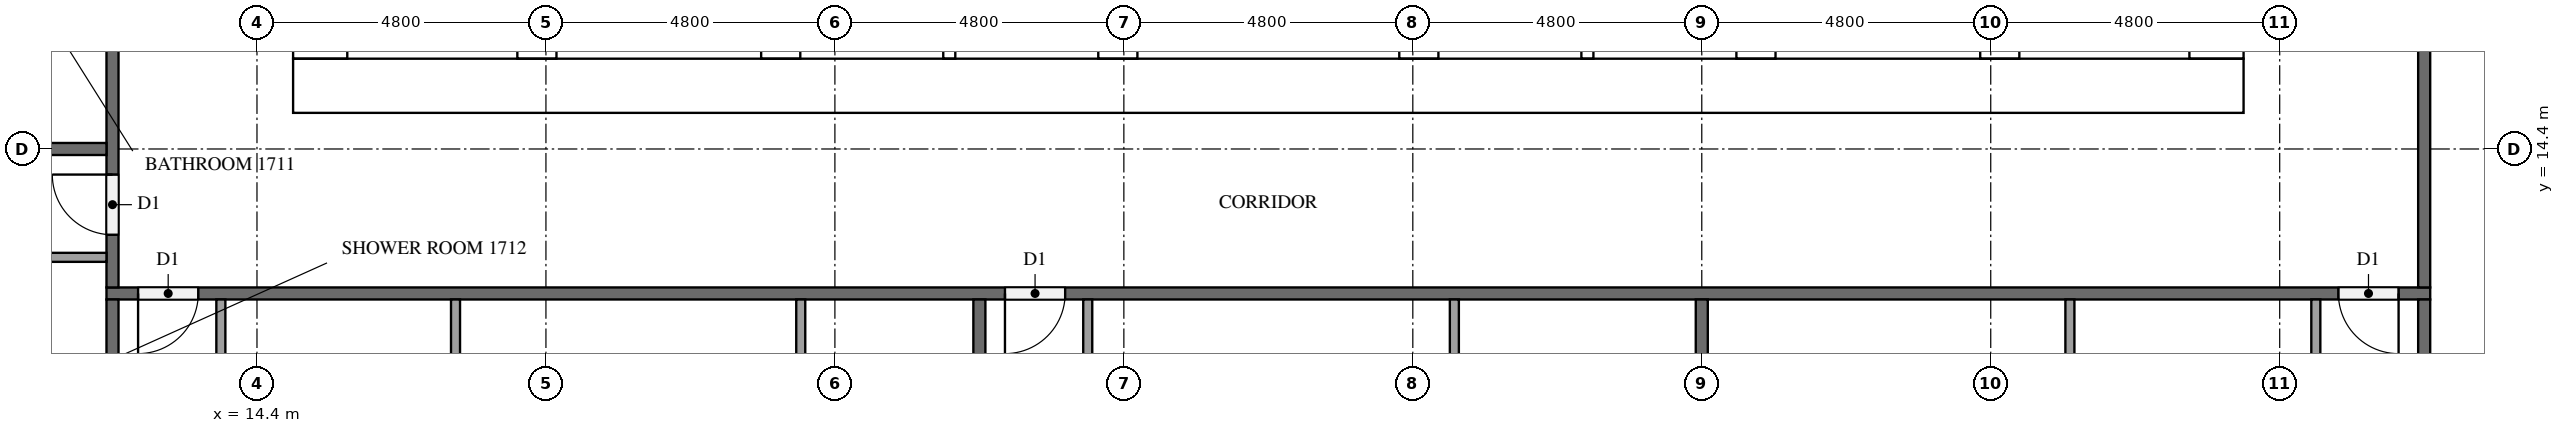
"""IFC4 building model, lengths in metres.
Left out: names, types, materials, properties, quantities, classifications, styles, units other than length and angle.
Written with IfcOpenShell. Run it as: python <this file> out.ifc"""

import sys

from ifc_helpers import new_model, si_unit, direction, frame, frame_2d, origin, place, context, subcontext, project, spatial, rectangle, extrude, element, fill, save


model = new_model("IFC4")
c1 = context("Model", 3, precision=1e-05, world=origin(), true_north=direction((0.0, 1.0)))
c2 = subcontext(c1, "Body", "Model", "MODEL_VIEW")
j1 = project(units=[si_unit("LENGTHUNIT", "METRE"), si_unit("PLANEANGLEUNIT", "RADIAN")], contexts=[c1])
p1 = place(None, origin())
s1 = spatial("IfcSite", under=j1, at=p1, CompositionType="ELEMENT")
p2 = place(p1, origin())
s2 = spatial("IfcBuilding", under=s1, at=p2, CompositionType="ELEMENT")
p3 = place(p2, frame((0.0, 0.0, 69.8)))
s3 = spatial("IfcBuildingStorey", under=s2, at=p3, CompositionType="ELEMENT", Elevation=69.8)
p4 = place(p3, frame((15.0, 15.45, 0.0), z_axis=(0.0, 0.0, 1.0), x_axis=(1.0, 0.0, 0.0)))
e1 = element("IfcWall", 1, at=p4, inside=s3, PredefinedType="SHEAR", context=c2, shape_type="SweptSolid", body=[
    extrude(rectangle(XDim=32.4, YDim=0.9, at=frame_2d((16.2, 0.0))), origin(), (0.0, 0.0, 1.0), 3.2),
])
p5 = place(p4, frame((15.3, 0.0, 0.0)))
e2 = element("IfcOpeningElement", 2, at=p5, cuts=e1, PredefinedType="OPENING", context=c2, shape_type="SweptSolid", body=[
    extrude(rectangle(XDim=1.8, YDim=2.1, at=frame_2d((0.9, 1.05))), frame((0.0, 0.46, 0.0), z_axis=(0.0, -1.0, 0.0), x_axis=(1.0, 0.0, 0.0)), (0.0, 0.0, 1.0), 0.92),
])
p6 = place(p3, frame((15.45, 15.9, 0.0), z_axis=(0.0, 0.0, 1.0), x_axis=(0.0, 1.0, 0.0)))
e3 = element("IfcWall", 3, at=p6, inside=s3, PredefinedType="SHEAR", context=c2, shape_type="SweptSolid", body=[
    extrude(rectangle(XDim=21.0, YDim=0.9, at=frame_2d((10.5, 0.0))), origin(), (0.0, 0.0, 1.0), 3.2),
])
p7 = place(p6, frame((4.86, 0.0, 0.0)))
e4 = element("IfcOpeningElement", 4, at=p7, cuts=e3, PredefinedType="OPENING", context=c2, shape_type="SweptSolid", body=[
    extrude(rectangle(XDim=1.2, YDim=2.1, at=frame_2d((0.6, 1.05))), frame((0.0, 0.46, 0.0), z_axis=(0.0, -1.0, 0.0), x_axis=(1.0, 0.0, 0.0)), (0.0, 0.0, 1.0), 0.92),
])
p8 = place(p3, frame((46.95, 15.9, 0.0), z_axis=(0.0, 0.0, 1.0), x_axis=(0.0, 1.0, 0.0)))
e5 = element("IfcWall", 5, at=p8, inside=s3, PredefinedType="SHEAR", context=c2, shape_type="SweptSolid", body=[
    extrude(rectangle(XDim=21.0, YDim=0.9, at=frame_2d((10.5, 0.0))), origin(), (0.0, 0.0, 1.0), 3.2),
])
p9 = place(p8, frame((10.2, 0.0, 0.0)))
e6 = element("IfcOpeningElement", 6, at=p9, cuts=e5, PredefinedType="OPENING", context=c2, shape_type="SweptSolid", body=[
    extrude(rectangle(XDim=1.2, YDim=2.1, at=frame_2d((0.6, 1.05))), frame((0.0, 0.46, 0.0), z_axis=(0.0, -1.0, 0.0), x_axis=(1.0, 0.0, 0.0)), (0.0, 0.0, 1.0), 0.92),
])
p10 = place(p3, frame((19.05, 15.9, 0.0), z_axis=(0.0, 0.0, 1.0), x_axis=(0.0, 1.0, 0.0)))
e7 = element("IfcWall", 7, at=p10, inside=s3, PredefinedType="SHEAR", context=c2, shape_type="SweptSolid", body=[
    extrude(rectangle(XDim=15.025, YDim=0.65, at=frame_2d((7.513, 0.0))), origin(), (0.0, 0.0, 1.0), 3.2),
])
p11 = place(p10, frame((9.55, 0.0, 0.0)))
e8 = element("IfcOpeningElement", 8, at=p11, cuts=e7, PredefinedType="OPENING", context=c2, shape_type="SweptSolid", body=[
    extrude(rectangle(XDim=1.1, YDim=2.1, at=frame_2d((0.55, 1.05))), frame((0.0, 0.335, 0.0), z_axis=(0.0, -1.0, 0.0), x_axis=(1.0, 0.0, 0.0)), (0.0, 0.0, 1.0), 0.67),
])
p12 = place(p10, frame((13.05, 0.0, 0.0)))
e9 = element("IfcOpeningElement", 9, at=p12, cuts=e7, PredefinedType="OPENING", context=c2, shape_type="SweptSolid", body=[
    extrude(rectangle(XDim=1.1, YDim=2.1, at=frame_2d((0.55, 1.05))), frame((0.0, 0.335, 0.0), z_axis=(0.0, -1.0, 0.0), x_axis=(1.0, 0.0, 0.0)), (0.0, 0.0, 1.0), 0.67),
])
p13 = place(p10, frame((0.3, 0.0, 0.0)))
e10 = element("IfcOpeningElement", 10, at=p13, cuts=e7, PredefinedType="OPENING", context=c2, shape_type="SweptSolid", body=[
    extrude(rectangle(XDim=1.2, YDim=2.1, at=frame_2d((0.6, 1.05))), frame((0.0, 0.335, 0.0), z_axis=(0.0, -1.0, 0.0), x_axis=(1.0, 0.0, 0.0)), (0.0, 0.0, 1.0), 0.67),
])
p14 = place(p3, frame((23.1, 15.9, 0.0), z_axis=(0.0, 0.0, 1.0), x_axis=(0.0, 1.0, 0.0)))
e11 = element("IfcWall", 11, at=p14, inside=s3, PredefinedType="SHEAR", context=c2, shape_type="SweptSolid", body=[
    extrude(rectangle(XDim=21.0, YDim=0.65, at=frame_2d((10.5, 0.0))), origin(), (0.0, 0.0, 1.0), 3.2),
])
p15 = place(p3, frame((39.3, 15.9, 0.0), z_axis=(0.0, 0.0, 1.0), x_axis=(0.0, 1.0, 0.0)))
e12 = element("IfcWall", 12, at=p15, inside=s3, PredefinedType="SHEAR", context=c2, shape_type="SweptSolid", body=[
    extrude(rectangle(XDim=8.35, YDim=0.65, at=frame_2d((4.175, 0.0))), origin(), (0.0, 0.0, 1.0), 3.2),
])
p16 = place(p3, frame((43.35, 15.9, 0.0), z_axis=(0.0, 0.0, 1.0), x_axis=(0.0, 1.0, 0.0)))
e13 = element("IfcWall", 13, at=p16, inside=s3, PredefinedType="SHEAR", context=c2, shape_type="SweptSolid", body=[
    extrude(rectangle(XDim=8.35, YDim=0.65, at=frame_2d((4.175, 0.0))), origin(), (0.0, 0.0, 1.0), 3.2),
])
p17 = place(p16, frame((0.3, 0.0, 0.0)))
e14 = element("IfcOpeningElement", 14, at=p17, cuts=e13, PredefinedType="OPENING", context=c2, shape_type="SweptSolid", body=[
    extrude(rectangle(XDim=1.2, YDim=2.1, at=frame_2d((0.6, 1.05))), frame((0.0, 0.335, 0.0), z_axis=(0.0, -1.0, 0.0), x_axis=(1.0, 0.0, 0.0)), (0.0, 0.0, 1.0), 0.67),
])
for number, where, z_axis, x_axis in (
    (15, (28.7, 15.9, 0.0), (0.0, 0.0, 1.0), (0.0, 1.0, 0.0)),
    (16, (33.7, 15.9, 0.0), (0.0, 0.0, 1.0), (0.0, 1.0, 0.0)),
):
    element("IfcWall", number, at=place(p3, frame(where, z_axis=z_axis, x_axis=x_axis)), inside=s3, PredefinedType="SHEAR", context=c2, shape_type="SweptSolid", body=[
        extrude(rectangle(XDim=2.525, YDim=0.65, at=frame_2d((1.263, 0.0))), origin(), (0.0, 0.0, 1.0), 3.2),
    ])
for number, where, z_axis, x_axis in (
    (17, (25.9, 15.9, 0.0), (0.0, 0.0, 1.0), (0.0, 1.0, 0.0)),
    (18, (36.5, 15.9, 0.0), (0.0, 0.0, 1.0), (0.0, 1.0, 0.0)),
):
    element("IfcWall", number, at=place(p3, frame(where, z_axis=z_axis, x_axis=x_axis)), inside=s3, PredefinedType="SOLIDWALL", context=c2, shape_type="SweptSolid", body=[
        extrude(rectangle(XDim=2.525, YDim=0.2, at=frame_2d((1.263, 0.0))), origin(), (0.0, 0.0, 1.0), 3.2),
    ])
p18 = place(p3, frame((50.5, 12.0, 0.0), z_axis=(0.0, 0.0, 1.0), x_axis=(-1.0, 0.0, 0.0)))
e19 = element("IfcWall", 19, at=p18, inside=s3, PredefinedType="PARTITIONING", context=c2, shape_type="SweptSolid", body=[
    extrude(rectangle(XDim=38.6, YDim=0.2, at=frame_2d((19.3, 0.0))), origin(), (0.0, 0.0, 1.0), 3.2),
])
p19 = place(p18, frame((37.075, 0.0, 0.0)))
e20 = element("IfcOpeningElement", 20, at=p19, cuts=e19, PredefinedType="OPENING", context=c2, shape_type="SweptSolid", body=[
    extrude(rectangle(XDim=1.0, YDim=2.1, at=frame_2d((0.5, 1.05))), frame((0.0, 0.11, 0.0), z_axis=(0.0, -1.0, 0.0), x_axis=(1.0, 0.0, 0.0)), (0.0, 0.0, 1.0), 0.22),
])
p20 = place(p18, frame((22.675, 0.0, 0.0)))
e21 = element("IfcOpeningElement", 21, at=p20, cuts=e19, PredefinedType="OPENING", context=c2, shape_type="SweptSolid", body=[
    extrude(rectangle(XDim=1.0, YDim=2.1, at=frame_2d((0.5, 1.05))), frame((0.0, 0.11, 0.0), z_axis=(0.0, -1.0, 0.0), x_axis=(1.0, 0.0, 0.0)), (0.0, 0.0, 1.0), 0.22),
])
p21 = place(p18, frame((0.525, 0.0, 0.0)))
e22 = element("IfcOpeningElement", 22, at=p21, cuts=e19, PredefinedType="OPENING", context=c2, shape_type="SweptSolid", body=[
    extrude(rectangle(XDim=1.0, YDim=2.1, at=frame_2d((0.5, 1.05))), frame((0.0, 0.11, 0.0), z_axis=(0.0, -1.0, 0.0), x_axis=(1.0, 0.0, 0.0)), (0.0, 0.0, 1.0), 0.22),
])
p22 = place(p3, frame((50.4, 40.7, 0.0), z_axis=(0.0, 0.0, 1.0), x_axis=(0.0, -1.0, 0.0)))
e23 = element("IfcWall", 23, at=p22, inside=s3, PredefinedType="PARTITIONING", context=c2, shape_type="SweptSolid", body=[
    extrude(rectangle(XDim=28.6, YDim=0.2, at=frame_2d((14.3, 0.0))), origin(), (0.0, 0.0, 1.0), 3.2),
])
p23 = place(p22, frame((21.875, 0.0, 0.0)))
e24 = element("IfcOpeningElement", 24, at=p23, cuts=e23, PredefinedType="OPENING", context=c2, shape_type="SweptSolid", body=[
    extrude(rectangle(XDim=1.1, YDim=2.1, at=frame_2d((0.55, 1.05))), frame((0.0, 0.11, 0.0), z_axis=(0.0, -1.0, 0.0), x_axis=(1.0, 0.0, 0.0)), (0.0, 0.0, 1.0), 0.22),
])
p24 = place(p22, frame((20.075, 0.0, 0.0)))
e25 = element("IfcOpeningElement", 25, at=p24, cuts=e23, PredefinedType="OPENING", context=c2, shape_type="SweptSolid", body=[
    extrude(rectangle(XDim=1.0, YDim=2.1, at=frame_2d((0.5, 1.05))), frame((0.0, 0.11, 0.0), z_axis=(0.0, -1.0, 0.0), x_axis=(1.0, 0.0, 0.0)), (0.0, 0.0, 1.0), 0.22),
])
p25 = place(p22, frame((5.675, 0.0, 0.0)))
e26 = element("IfcOpeningElement", 26, at=p25, cuts=e23, PredefinedType="OPENING", context=c2, shape_type="SweptSolid", body=[
    extrude(rectangle(XDim=1.0, YDim=2.1, at=frame_2d((0.5, 1.05))), frame((0.0, 0.11, 0.0), z_axis=(0.0, -1.0, 0.0), x_axis=(1.0, 0.0, 0.0)), (0.0, 0.0, 1.0), 0.22),
])
p26 = place(p3, frame((12.0, 12.1, 0.0), z_axis=(0.0, 0.0, 1.0), x_axis=(0.0, 1.0, 0.0)))
e27 = element("IfcWall", 27, at=p26, inside=s3, PredefinedType="PARTITIONING", context=c2, shape_type="SweptSolid", body=[
    extrude(rectangle(XDim=28.6, YDim=0.2, at=frame_2d((14.3, 0.0))), origin(), (0.0, 0.0, 1.0), 3.2),
])
p27 = place(p26, frame((14.725, 0.0, 0.0)))
e28 = element("IfcOpeningElement", 28, at=p27, cuts=e27, PredefinedType="OPENING", context=c2, shape_type="SweptSolid", body=[
    extrude(rectangle(XDim=1.0, YDim=2.1, at=frame_2d((0.5, 1.05))), frame((0.0, 0.11, 0.0), z_axis=(0.0, -1.0, 0.0), x_axis=(1.0, 0.0, 0.0)), (0.0, 0.0, 1.0), 0.22),
])
p28 = place(p26, frame((12.875, 0.0, 0.0)))
e29 = element("IfcOpeningElement", 29, at=p28, cuts=e27, PredefinedType="OPENING", context=c2, shape_type="SweptSolid", body=[
    extrude(rectangle(XDim=1.0, YDim=2.1, at=frame_2d((0.5, 1.05))), frame((0.0, 0.11, 0.0), z_axis=(0.0, -1.0, 0.0), x_axis=(1.0, 0.0, 0.0)), (0.0, 0.0, 1.0), 0.22),
])
p29 = place(p26, frame((0.875, 0.0, 0.0)))
e30 = element("IfcOpeningElement", 30, at=p29, cuts=e27, PredefinedType="OPENING", context=c2, shape_type="SweptSolid", body=[
    extrude(rectangle(XDim=1.0, YDim=2.1, at=frame_2d((0.5, 1.05))), frame((0.0, 0.11, 0.0), z_axis=(0.0, -1.0, 0.0), x_axis=(1.0, 0.0, 0.0)), (0.0, 0.0, 1.0), 0.22),
])
for number, where, z_axis, x_axis in (
    (31, (26.4, 11.9, 0.0), (0.0, 0.0, 1.0), (0.0, -1.0, 0.0)),
    (32, (12.0, 0.1, 0.0), (0.0, 0.0, 1.0), (0.0, 1.0, 0.0)),
):
    element("IfcWall", number, at=place(p3, frame(where, z_axis=z_axis, x_axis=x_axis)), inside=s3, PredefinedType="PARTITIONING", context=c2, shape_type="SweptSolid", body=[
        extrude(rectangle(XDim=11.8, YDim=0.2, at=frame_2d((5.9, 0.0))), origin(), (0.0, 0.0, 1.0), 3.2),
    ])
p30 = place(p3, frame((38.4, 11.9, 0.0), z_axis=(0.0, 0.0, 1.0), x_axis=(0.0, -1.0, 0.0)))
e33 = element("IfcWall", 33, at=p30, inside=s3, PredefinedType="PARTITIONING", context=c2, shape_type="SweptSolid", body=[
    extrude(rectangle(XDim=11.475, YDim=0.2, at=frame_2d((5.737, 0.0))), origin(), (0.0, 0.0, 1.0), 3.2),
])
p31 = place(p3, frame((50.4, 11.9, 0.0), z_axis=(0.0, 0.0, 1.0), x_axis=(0.0, -1.0, 0.0)))
e34 = element("IfcWall", 34, at=p31, inside=s3, PredefinedType="PARTITIONING", context=c2, shape_type="SweptSolid", body=[
    extrude(rectangle(XDim=11.8, YDim=0.2, at=frame_2d((5.9, 0.0))), origin(), (0.0, 0.0, 1.0), 3.2),
])
p32 = place(p3, frame((5.225, 14.4, 0.0), z_axis=(0.0, 0.0, 1.0), x_axis=(1.0, 0.0, 0.0)))
e35 = element("IfcWall", 35, at=p32, inside=s3, PredefinedType="PARTITIONING", context=c2, shape_type="SweptSolid", body=[
    extrude(rectangle(XDim=6.675, YDim=0.2, at=frame_2d((3.337, 0.0))), origin(), (0.0, 0.0, 1.0), 3.2),
])
for number, where, z_axis, x_axis in (
    (36, (17.698, 11.9, 0.0), (0.0, 0.0, 1.0), (0.0, -1.0, 0.0)),
    (37, (23.433, 11.9, 0.0), (0.0, 0.0, 1.0), (0.0, -1.0, 0.0)),
):
    element("IfcWall", number, at=place(p3, frame(where, z_axis=z_axis, x_axis=x_axis)), inside=s3, PredefinedType="PARTITIONING", context=c2, shape_type="SweptSolid", body=[
        extrude(rectangle(XDim=2.975, YDim=0.15, at=frame_2d((1.487, 0.0))), origin(), (0.0, 0.0, 1.0), 3.2),
    ])
p33 = place(p3, frame((13.8, 11.9, 0.0), z_axis=(0.0, 0.0, 1.0), x_axis=(0.0, -1.0, 0.0)))
e38 = element("IfcWall", 38, at=p33, inside=s3, PredefinedType="PARTITIONING", context=c2, shape_type="SweptSolid", body=[
    extrude(rectangle(XDim=3.125, YDim=0.15, at=frame_2d((1.562, 0.0))), origin(), (0.0, 0.0, 1.0), 3.2),
])
p34 = place(p3, frame((34.29, 11.9, 0.0), z_axis=(0.0, 0.0, 1.0), x_axis=(0.0, -1.0, 0.0)))
e39 = element("IfcWall", 39, at=p34, inside=s3, PredefinedType="PARTITIONING", context=c2, shape_type="SweptSolid", body=[
    extrude(rectangle(XDim=3.725, YDim=0.15, at=frame_2d((1.862, 0.0))), origin(), (0.0, 0.0, 1.0), 3.2),
])
p35 = place(p3, frame((28.2, 11.9, 0.0), z_axis=(0.0, 0.0, 1.0), x_axis=(0.0, -1.0, 0.0)))
e40 = element("IfcWall", 40, at=p35, inside=s3, PredefinedType="PARTITIONING", context=c2, shape_type="SweptSolid", body=[
    extrude(rectangle(XDim=3.875, YDim=0.15, at=frame_2d((1.938, 0.0))), origin(), (0.0, 0.0, 1.0), 3.2),
])
p36 = place(p3, frame((44.515, 11.9, 0.0), z_axis=(0.0, 0.0, 1.0), x_axis=(0.0, -1.0, 0.0)))
e41 = element("IfcWall", 41, at=p36, inside=s3, PredefinedType="PARTITIONING", context=c2, shape_type="SweptSolid", body=[
    extrude(rectangle(XDim=4.175, YDim=0.15, at=frame_2d((2.087, 0.0))), origin(), (0.0, 0.0, 1.0), 3.2),
])
p37 = place(p3, frame((48.6, 11.9, 0.0), z_axis=(0.0, 0.0, 1.0), x_axis=(0.0, -1.0, 0.0)))
e42 = element("IfcWall", 42, at=p37, inside=s3, PredefinedType="PARTITIONING", context=c2, shape_type="SweptSolid", body=[
    extrude(rectangle(XDim=4.325, YDim=0.15, at=frame_2d((2.163, 0.0))), origin(), (0.0, 0.0, 1.0), 3.2),
])
p38 = place(p3, frame((11.9, 12.6, 0.0), z_axis=(0.0, 0.0, 1.0), x_axis=(-1.0, 0.0, 0.0)))
e43 = element("IfcWall", 43, at=p38, inside=s3, PredefinedType="PARTITIONING", context=c2, shape_type="SweptSolid", body=[
    extrude(rectangle(XDim=2.075, YDim=0.15, at=frame_2d((1.038, 0.0))), origin(), (0.0, 0.0, 1.0), 3.2),
])
p39 = place(p5, frame((1.8, 0.0, 0.0), z_axis=(0.0, 0.0, 1.0), x_axis=(-1.0, 0.0, 0.0)))
e44 = element("IfcDoor", 44, at=p39, inside=s3, OperationType="DOUBLE_DOOR_SINGLE_SWING", PredefinedType="DOOR", context=c2, shape_type="SweptSolid", body=[
    extrude(rectangle(XDim=1.8, YDim=2.1, at=frame_2d((0.9, 1.05))), frame((0.0, 0.025, 0.0), z_axis=(0.0, -1.0, 0.0), x_axis=(1.0, 0.0, 0.0)), (0.0, 0.0, 1.0), 0.05),
])
fill(e2, e44)
p40 = place(p19, origin())
e45 = element("IfcDoor", 45, at=p40, inside=s3, OperationType="SINGLE_SWING_RIGHT", PredefinedType="DOOR", context=c2, shape_type="SweptSolid", body=[
    extrude(rectangle(XDim=1.0, YDim=2.1, at=frame_2d((0.5, 1.05))), frame((0.0, 0.025, 0.0), z_axis=(0.0, -1.0, 0.0), x_axis=(1.0, 0.0, 0.0)), (0.0, 0.0, 1.0), 0.05),
])
fill(e20, e45)
p41 = place(p20, origin())
e46 = element("IfcDoor", 46, at=p41, inside=s3, OperationType="SINGLE_SWING_RIGHT", PredefinedType="DOOR", context=c2, shape_type="SweptSolid", body=[
    extrude(rectangle(XDim=1.0, YDim=2.1, at=frame_2d((0.5, 1.05))), frame((0.0, 0.025, 0.0), z_axis=(0.0, -1.0, 0.0), x_axis=(1.0, 0.0, 0.0)), (0.0, 0.0, 1.0), 0.05),
])
fill(e21, e46)
p42 = place(p21, origin())
e47 = element("IfcDoor", 47, at=p42, inside=s3, OperationType="SINGLE_SWING_LEFT", PredefinedType="DOOR", context=c2, shape_type="SweptSolid", body=[
    extrude(rectangle(XDim=1.0, YDim=2.1, at=frame_2d((0.5, 1.05))), frame((0.0, 0.025, 0.0), z_axis=(0.0, -1.0, 0.0), x_axis=(1.0, 0.0, 0.0)), (0.0, 0.0, 1.0), 0.05),
])
fill(e22, e47)
p43 = place(p29, origin())
e48 = element("IfcDoor", 48, at=p43, inside=s3, OperationType="SINGLE_SWING_RIGHT", PredefinedType="DOOR", context=c2, shape_type="SweptSolid", body=[
    extrude(rectangle(XDim=1.0, YDim=2.1, at=frame_2d((0.5, 1.05))), frame((0.0, 0.025, 0.0), z_axis=(0.0, -1.0, 0.0), x_axis=(1.0, 0.0, 0.0)), (0.0, 0.0, 1.0), 0.05),
])
fill(e30, e48)
save(model, sys.argv[1])
